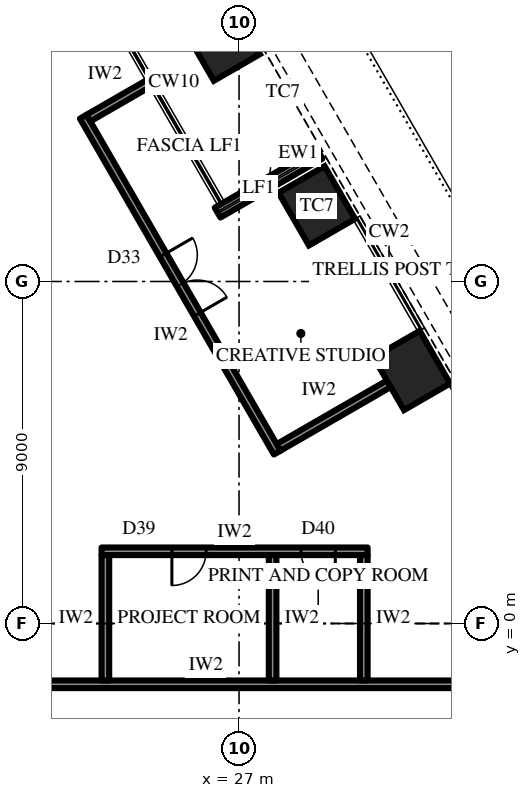
"""IFC4 building model, lengths in metres.
Left out: names, types, materials, properties, quantities, classifications, styles, units other than length and angle.
Written with IfcOpenShell. Run it as: python <this file> out.ifc"""

import sys

from ifc_helpers import new_model, si_unit, direction, frame, frame_2d, origin, origin_2d, place, context, subcontext, project, spatial, rectangle, extrude, element, fill, save


model = new_model("IFC4")
c1 = context("Model", 3, precision=1e-05, world=origin(), true_north=direction((0.0, 1.0)))
c2 = subcontext(c1, "Body", "Model", "MODEL_VIEW")
j1 = project(units=[si_unit("LENGTHUNIT", "METRE"), si_unit("PLANEANGLEUNIT", "RADIAN")], contexts=[c1])
p1 = place(None, origin())
s1 = spatial("IfcSite", under=j1, at=p1, CompositionType="ELEMENT")
p2 = place(p1, origin())
s2 = spatial("IfcBuilding", under=s1, at=p2, CompositionType="ELEMENT")
p3 = place(p2, frame((0.0, 0.0, 174.1)))
s3 = spatial("IfcBuildingStorey", under=s2, at=p3, CompositionType="ELEMENT", Elevation=174.1)
for number, where, z_axis, x_axis in (
    (1, (31.547, 6.658, 0.0), (0.0, 0.0, 1.0), (-0.5, 0.866, 0.0)),
    (2, (29.045, 10.992, 0.0), (0.0, 0.0, 1.0), (-0.5, 0.866, 0.0)),
    (3, (26.544, 15.325, 0.0), (0.0, 0.0, 1.0), (-0.5, 0.866, 0.0)),
):
    element("IfcColumn", number, at=place(p3, frame(where, z_axis=z_axis, x_axis=x_axis)), inside=s3, PredefinedType="COLUMN", context=c2, shape_type="SweptSolid", body=[
        extrude(rectangle(XDim=1.6, YDim=1.4, at=origin_2d()), origin(), (0.0, 0.0, 1.0), 4.2),
    ])
p4 = place(p3, frame((29.12, 12.363, 0.0), z_axis=(0.0, 0.0, 1.0), x_axis=(-0.86602952684, -0.49999285859, 0.0)))
e4 = element("IfcWall", 4, at=p4, inside=s3, PredefinedType="SOLIDWALL", context=c2, shape_type="SweptSolid", body=[
    extrude(rectangle(XDim=3.1, YDim=0.3, at=frame_2d((1.55, 0.0))), origin(), (0.0, 0.0, 1.0), 2.75),
])
p5 = place(p3, frame((28.003, 4.497, 0.0), z_axis=(0.0, 0.0, 1.0), x_axis=(-0.500005407604, 0.86602228168, 0.0)))
e5 = element("IfcWall", 5, at=p5, inside=s3, PredefinedType="PARTITIONING", context=c2, shape_type="SweptSolid", body=[
    extrude(rectangle(XDim=10.208, YDim=0.2, at=frame_2d((5.104, 0.0))), origin(), (0.0, 0.0, 1.0), 4.0),
])
p6 = place(p5, frame((4.204, 0.0, 0.0)))
e6 = element("IfcOpeningElement", 6, at=p6, cuts=e5, PredefinedType="OPENING", context=c2, shape_type="SweptSolid", body=[
    extrude(rectangle(XDim=1.8, YDim=2.4, at=frame_2d((0.9, 1.2))), frame((0.0, 0.11, 0.0), z_axis=(0.0, -1.0, 0.0), x_axis=(1.0, 0.0, 0.0)), (0.0, 0.0, 1.0), 0.22),
])
p7 = place(p3, frame((28.04, 4.633, 0.0), z_axis=(0.0, 0.0, 1.0), x_axis=(0.866014461049, 0.500018952895, 0.0)))
e7 = element("IfcWall", 7, at=p7, inside=s3, PredefinedType="PARTITIONING", context=c2, shape_type="SweptSolid", body=[
    extrude(rectangle(XDim=3.35, YDim=0.2, at=frame_2d((1.675, 0.0))), origin(), (0.0, 0.0, 1.0), 3.082),
])
p8 = place(p3, frame((23.036, 13.3, 0.0), z_axis=(0.0, 0.0, 1.0), x_axis=(0.866029456041, 0.49999298122, 0.0)))
e8 = element("IfcWall", 8, at=p8, inside=s3, PredefinedType="PARTITIONING", context=c2, shape_type="SweptSolid", body=[
    extrude(rectangle(XDim=1.901, YDim=0.2, at=frame_2d((0.95, 0.0))), origin(), (0.0, 0.0, 1.0), 4.0),
])
p9 = place(p3, frame((18.6, -1.6, 0.0), z_axis=(0.0, 0.0, 1.0), x_axis=(1.0, 0.0, 0.0)))
e9 = element("IfcWall", 9, at=p9, inside=s3, PredefinedType="PARTITIONING", context=c2, shape_type="SweptSolid", body=[
    extrude(rectangle(XDim=15.059, YDim=0.2, at=frame_2d((7.53, 0.0))), origin(), (0.0, 0.0, 1.0), 4.0),
])
p10 = place(p9, frame((1.006, 0.0, 0.0)))
e10 = element("IfcOpeningElement", 10, at=p10, cuts=e9, PredefinedType="OPENING", context=c2, shape_type="SweptSolid", body=[
    extrude(rectangle(XDim=1.0, YDim=2.2, at=frame_2d((0.5, 1.1))), frame((0.0, 0.11, 0.0), z_axis=(0.0, -1.0, 0.0), x_axis=(1.0, 0.0, 0.0)), (0.0, 0.0, 1.0), 0.22),
])
p11 = place(p3, frame((23.383, 1.9, 0.0), z_axis=(0.0, 0.0, 1.0), x_axis=(1.0, 0.0, 0.0)))
e11 = element("IfcWall", 11, at=p11, inside=s3, PredefinedType="PARTITIONING", context=c2, shape_type="SweptSolid", body=[
    extrude(rectangle(XDim=7.0, YDim=0.2, at=frame_2d((3.5, 0.0))), origin(), (0.0, 0.0, 1.0), 4.0),
])
p12 = place(p11, frame((1.85, 0.0, 0.0)))
e12 = element("IfcOpeningElement", 12, at=p12, cuts=e11, PredefinedType="OPENING", context=c2, shape_type="SweptSolid", body=[
    extrude(rectangle(XDim=0.9, YDim=2.2, at=frame_2d((0.45, 1.1))), frame((0.0, 0.11, 0.0), z_axis=(0.0, -1.0, 0.0), x_axis=(1.0, 0.0, 0.0)), (0.0, 0.0, 1.0), 0.22),
])
p13 = place(p11, frame((5.25, 0.0, 0.0)))
e13 = element("IfcOpeningElement", 13, at=p13, cuts=e11, PredefinedType="OPENING", context=c2, shape_type="SweptSolid", body=[
    extrude(rectangle(XDim=0.9, YDim=2.2, at=frame_2d((0.45, 1.1))), frame((0.0, 0.11, 0.0), z_axis=(0.0, -1.0, 0.0), x_axis=(1.0, 0.0, 0.0)), (0.0, 0.0, 1.0), 0.22),
])
for number, where, z_axis, x_axis in (
    (14, (23.483, -1.5, 0.0), (0.0, 0.0, 1.0), (0.0, 1.0, 0.0)),
    (15, (27.883, -1.5, 0.0), (0.0, 0.0, 1.0), (0.0, 1.0, 0.0)),
    (16, (30.283, -1.5, 0.0), (0.0, 0.0, 1.0), (0.0, 1.0, 0.0)),
):
    element("IfcWall", number, at=place(p3, frame(where, z_axis=z_axis, x_axis=x_axis)), inside=s3, PredefinedType="PARTITIONING", context=c2, shape_type="SweptSolid", body=[
        extrude(rectangle(XDim=3.3, YDim=0.2, at=frame_2d((1.65, 0.0))), origin(), (0.0, 0.0, 1.0), 4.0),
    ])
p14 = place(p6, frame((1.8, 0.0, 0.0), z_axis=(0.0, 0.0, 1.0), x_axis=(-1.0, 0.0, 0.0)))
e17 = element("IfcDoor", 17, at=p14, inside=s3, OperationType="DOUBLE_DOOR_SINGLE_SWING", PredefinedType="DOOR", context=c2, shape_type="SweptSolid", body=[
    extrude(rectangle(XDim=1.8, YDim=2.4, at=frame_2d((0.9, 1.2))), frame((0.0, 0.025, 0.0), z_axis=(0.0, -1.0, 0.0), x_axis=(1.0, 0.0, 0.0)), (0.0, 0.0, 1.0), 0.05),
])
fill(e6, e17)
p15 = place(p12, frame((0.9, 0.0, 0.0), z_axis=(0.0, 0.0, 1.0), x_axis=(-1.0, 0.0, 0.0)))
e18 = element("IfcDoor", 18, at=p15, inside=s3, OperationType="SINGLE_SWING_LEFT", PredefinedType="DOOR", context=c2, shape_type="SweptSolid", body=[
    extrude(rectangle(XDim=0.9, YDim=2.2, at=frame_2d((0.45, 1.1))), frame((0.0, 0.025, 0.0), z_axis=(0.0, -1.0, 0.0), x_axis=(1.0, 0.0, 0.0)), (0.0, 0.0, 1.0), 0.05),
])
fill(e12, e18)
p16 = place(p13, frame((0.9, 0.0, 0.0), z_axis=(0.0, 0.0, 1.0), x_axis=(-1.0, 0.0, 0.0)))
e19 = element("IfcDoor", 19, at=p16, inside=s3, OperationType="SINGLE_SWING_RIGHT", PredefinedType="DOOR", context=c2, shape_type="SweptSolid", body=[
    extrude(rectangle(XDim=0.9, YDim=2.2, at=frame_2d((0.45, 1.1))), frame((0.0, 0.025, 0.0), z_axis=(0.0, -1.0, 0.0), x_axis=(1.0, 0.0, 0.0)), (0.0, 0.0, 1.0), 0.05),
])
fill(e13, e19)
save(model, sys.argv[1])
